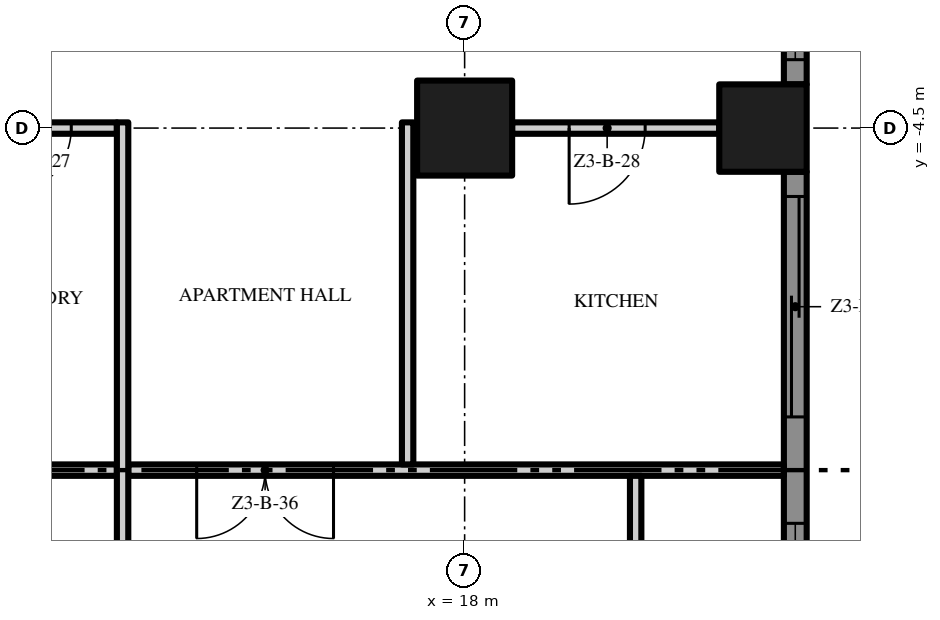
"""IFC4 building model, lengths in metres.
Left out: names, types, materials, properties, quantities, classifications, styles, units other than length and angle.
Written with IfcOpenShell. Run it as: python <this file> out.ifc"""

import sys

from ifc_helpers import new_model, si_unit, direction, frame, frame_2d, origin, origin_2d, place, context, subcontext, project, spatial, polyline, rectangle, outline, extrude, element, fill, save


model = new_model("IFC4")
c1 = context("Model", 3, precision=1e-05, world=origin(), true_north=direction((0.0, 1.0)))
c2 = subcontext(c1, "Body", "Model", "MODEL_VIEW")
j1 = project(units=[si_unit("LENGTHUNIT", "METRE"), si_unit("PLANEANGLEUNIT", "RADIAN")], contexts=[c1])
p1 = place(None, origin())
s1 = spatial("IfcSite", under=j1, at=p1, CompositionType="ELEMENT")
p2 = place(p1, origin())
s2 = spatial("IfcBuilding", under=s1, at=p2, CompositionType="ELEMENT")
p3 = place(p2, frame((0.0, 0.0, 140.2)))
s3 = spatial("IfcBuildingStorey", under=s2, at=p3, CompositionType="ELEMENT", Elevation=140.2)
p4 = place(p3, frame((18.0, -4.5, 0.0), z_axis=(0.0, 0.0, 1.0), x_axis=(1.0, 0.0, 0.0)))
e1 = element("IfcColumn", 1, at=p4, inside=s3, PredefinedType="COLUMN", context=c2, shape_type="SweptSolid", body=[
    extrude(rectangle(XDim=1.25, YDim=1.25, at=origin_2d()), origin(), (0.0, 0.0, 1.0), 3.5),
])
p5 = place(p3, frame((21.925, -4.5, 0.0), z_axis=(0.0, 0.0, 1.0), x_axis=(1.0, 0.0, 0.0)))
e2 = element("IfcColumn", 2, at=p5, inside=s3, PredefinedType="COLUMN", context=c2, shape_type="SweptSolid", body=[
    extrude(rectangle(XDim=1.15, YDim=1.15, at=origin_2d()), origin(), (0.0, 0.0, 1.0), 3.5),
])
p6 = place(p3, frame((22.35, -5.075, 0.0), z_axis=(0.0, 0.0, 1.0), x_axis=(0.0, -1.0, 0.0)))
e3 = element("IfcWall", 3, at=p6, inside=s3, PredefinedType="SOLIDWALL", context=c2, shape_type="SweptSolid", body=[
    extrude(rectangle(XDim=7.275, YDim=0.3, at=frame_2d((3.638, 0.0))), origin(), (0.0, 0.0, 1.0), 3.5),
])
p7 = place(p6, frame((4.625, 0.0, 0.45)))
e4 = element("IfcOpeningElement", 4, at=p7, cuts=e3, PredefinedType="OPENING", context=c2, shape_type="SweptSolid", body=[
    extrude(rectangle(XDim=2.35, YDim=2.65, at=frame_2d((1.175, 1.325))), frame((0.0, 0.16, 0.0), z_axis=(0.0, -1.0, 0.0), x_axis=(1.0, 0.0, 0.0)), (0.0, 0.0, 1.0), 0.32),
])
p8 = place(p6, frame((0.325, 0.0, 0.0)))
e5 = element("IfcOpeningElement", 5, at=p8, cuts=e3, PredefinedType="OPENING", context=c2, shape_type="SweptSolid", body=[
    extrude(rectangle(XDim=2.9, YDim=2.4, at=frame_2d((1.45, 1.2))), frame((0.0, 0.16, 0.0), z_axis=(0.0, -1.0, 0.0), x_axis=(1.0, 0.0, 0.0)), (0.0, 0.0, 1.0), 0.32),
])
p9 = place(p3, frame((22.35, 3.925, 0.0), z_axis=(0.0, 0.0, 1.0), x_axis=(0.0, -1.0, 0.0)))
e6 = element("IfcWall", 6, at=p9, inside=s3, PredefinedType="SOLIDWALL", context=c2, shape_type="SweptSolid", body=[
    extrude(rectangle(XDim=7.85, YDim=0.3, at=frame_2d((3.925, 0.0))), origin(), (0.0, 0.0, 1.0), 3.5),
])
p10 = place(p9, frame((4.625, 0.0, 0.45)))
e7 = element("IfcOpeningElement", 7, at=p10, cuts=e6, PredefinedType="OPENING", context=c2, shape_type="SweptSolid", body=[
    extrude(rectangle(XDim=2.9, YDim=2.65, at=frame_2d((1.45, 1.325))), frame((0.0, 0.16, 0.0), z_axis=(0.0, -1.0, 0.0), x_axis=(1.0, 0.0, 0.0)), (0.0, 0.0, 1.0), 0.32),
])
p11 = place(p9, frame((0.325, 0.0, 0.45)))
e8 = element("IfcOpeningElement", 8, at=p11, cuts=e6, PredefinedType="OPENING", context=c2, shape_type="SweptSolid", body=[
    extrude(rectangle(XDim=2.9, YDim=2.65, at=frame_2d((1.45, 1.325))), frame((0.0, 0.16, 0.0), z_axis=(0.0, -1.0, 0.0), x_axis=(1.0, 0.0, 0.0)), (0.0, 0.0, 1.0), 0.32),
])
p12 = place(p3, origin())
e9 = element("IfcWall", 9, at=p12, inside=s3, PredefinedType="USERDEFINED", context=c2, shape_type="SweptSolid", body=[
    extrude(outline(polyline([(23.451, -13.5), (24.112, -12.0), (24.845, -10.5), (25.369, -9.0), (25.5, -7.875), (25.485, -7.5), (25.149, -6.0), (24.488, -4.5), (23.755, -3.0), (23.231, -1.5), (23.1, -0.375), (23.115, 0.0), (23.451, 1.5), (24.112, 3.0), (24.845, 4.5), (25.369, 6.0), (25.5, 7.125), (25.485, 7.5), (25.149, 9.0), (24.488, 10.5), (23.755, 12.0), (23.231, 13.5), (23.1, 14.625), (23.115, 15.0), (23.451, 16.5), (24.112, 18.0), (23.883, 18.101), (23.213, 16.579), (22.866, 15.033), (22.849, 14.615), (22.986, 13.444), (23.524, 11.904), (24.261, 10.395), (24.91, 8.921), (25.236, 7.467), (25.249, 7.135), (25.124, 6.056), (24.614, 4.596), (23.885, 3.105), (23.213, 1.579), (22.866, 0.033), (22.849, -0.385), (22.986, -1.556), (23.524, -3.096), (24.261, -4.605), (24.91, -6.079), (25.236, -7.533), (25.249, -7.865), (25.124, -8.944), (24.614, -10.404), (23.885, -11.895), (23.223, -13.399), (23.451, -13.5)])), origin(), (0.0, 0.0, 1.0), 0.9),
])
p13 = place(p3, frame((13.425, -9.0, 0.0), z_axis=(0.0, 0.0, 1.0), x_axis=(-1.0, 0.0, 0.0)))
e10 = element("IfcWall", 10, at=p13, inside=s3, PredefinedType="PARTITIONING", context=c2, shape_type="SweptSolid", body=[
    extrude(rectangle(XDim=4.35, YDim=0.15, at=frame_2d((2.175, 0.0))), origin(), (0.0, 0.0, 1.0), 3.5),
])
p14 = place(p13, frame((2.8, 0.0, 0.0)))
e11 = element("IfcOpeningElement", 11, at=p14, cuts=e10, PredefinedType="OPENING", context=c2, shape_type="SweptSolid", body=[
    extrude(rectangle(XDim=1.0, YDim=2.4, at=frame_2d((0.5, 1.2))), frame((0.0, 0.085, 0.0), z_axis=(0.0, -1.0, 0.0), x_axis=(1.0, 0.0, 0.0)), (0.0, 0.0, 1.0), 0.17),
])
p15 = place(p3, frame((22.2, -9.0, 0.0), z_axis=(0.0, 0.0, 1.0), x_axis=(-1.0, 0.0, 0.0)))
e12 = element("IfcWall", 12, at=p15, inside=s3, PredefinedType="PARTITIONING", context=c2, shape_type="SweptSolid", body=[
    extrude(rectangle(XDim=8.625, YDim=0.15, at=frame_2d((4.312, 0.0))), origin(), (0.0, 0.0, 1.0), 3.5),
])
p16 = place(p15, frame((5.925, 0.0, 0.0)))
e13 = element("IfcOpeningElement", 13, at=p16, cuts=e12, PredefinedType="OPENING", context=c2, shape_type="SweptSolid", body=[
    extrude(rectangle(XDim=1.8, YDim=2.4, at=frame_2d((0.9, 1.2))), frame((0.0, 0.085, 0.0), z_axis=(0.0, -1.0, 0.0), x_axis=(1.0, 0.0, 0.0)), (0.0, 0.0, 1.0), 0.17),
])
p17 = place(p3, frame((13.425, -4.5, 0.0), z_axis=(0.0, 0.0, 1.0), x_axis=(-1.0, 0.0, 0.0)))
e14 = element("IfcWall", 14, at=p17, inside=s3, PredefinedType="PARTITIONING", context=c2, shape_type="SweptSolid", body=[
    extrude(rectangle(XDim=2.1, YDim=0.15, at=frame_2d((1.05, 0.0))), origin(), (0.0, 0.0, 1.0), 3.5),
])
p18 = place(p17, frame((0.6, 0.0, 0.0)))
e15 = element("IfcOpeningElement", 15, at=p18, cuts=e14, PredefinedType="OPENING", context=c2, shape_type="SweptSolid", body=[
    extrude(rectangle(XDim=0.9, YDim=2.1, at=frame_2d((0.45, 1.05))), frame((0.0, 0.085, 0.0), z_axis=(0.0, -1.0, 0.0), x_axis=(1.0, 0.0, 0.0)), (0.0, 0.0, 1.0), 0.17),
])
p19 = place(p3, frame((21.35, -4.5, 0.0), z_axis=(0.0, 0.0, 1.0), x_axis=(-1.0, 0.0, 0.0)))
e16 = element("IfcWall", 16, at=p19, inside=s3, PredefinedType="PARTITIONING", context=c2, shape_type="SweptSolid", body=[
    extrude(rectangle(XDim=2.725, YDim=0.15, at=frame_2d((1.363, 0.0))), origin(), (0.0, 0.0, 1.0), 3.5),
])
p20 = place(p19, frame((0.975, 0.0, 0.0)))
e17 = element("IfcOpeningElement", 17, at=p20, cuts=e16, PredefinedType="OPENING", context=c2, shape_type="SweptSolid", body=[
    extrude(rectangle(XDim=1.0, YDim=2.4, at=frame_2d((0.5, 1.2))), frame((0.0, 0.085, 0.0), z_axis=(0.0, -1.0, 0.0), x_axis=(1.0, 0.0, 0.0)), (0.0, 0.0, 1.0), 0.17),
])
p21 = place(p3, frame((13.5, -17.7, 0.0), z_axis=(0.0, 0.0, 1.0), x_axis=(0.0, 1.0, 0.0)))
e18 = element("IfcWall", 18, at=p21, inside=s3, PredefinedType="PARTITIONING", context=c2, shape_type="SweptSolid", body=[
    extrude(rectangle(XDim=13.275, YDim=0.15, at=frame_2d((6.638, 0.0))), origin(), (0.0, 0.0, 1.0), 3.5),
])
p22 = place(p3, frame((17.25, -8.925, 0.0), z_axis=(0.0, 0.0, 1.0), x_axis=(0.0, 1.0, 0.0)))
e19 = element("IfcWall", 19, at=p22, inside=s3, PredefinedType="PARTITIONING", context=c2, shape_type="SweptSolid", body=[
    extrude(rectangle(XDim=4.5, YDim=0.15, at=frame_2d((2.25, 0.0))), origin(), (0.0, 0.0, 1.0), 3.5),
])
p23 = place(p3, frame((20.25, -9.075, 0.0), z_axis=(0.0, 0.0, 1.0), x_axis=(0.0, -1.0, 0.0)))
e20 = element("IfcWall", 20, at=p23, inside=s3, PredefinedType="PARTITIONING", context=c2, shape_type="SweptSolid", body=[
    extrude(rectangle(XDim=3.0, YDim=0.15, at=frame_2d((1.5, 0.0))), origin(), (0.0, 0.0, 1.0), 3.5),
])
p24 = place(p23, frame((0.975, 0.0, 0.0)))
e21 = element("IfcOpeningElement", 21, at=p24, cuts=e20, PredefinedType="OPENING", context=c2, shape_type="SweptSolid", body=[
    extrude(rectangle(XDim=0.9, YDim=2.1, at=frame_2d((0.45, 1.05))), frame((0.0, 0.085, 0.0), z_axis=(0.0, -1.0, 0.0), x_axis=(1.0, 0.0, 0.0)), (0.0, 0.0, 1.0), 0.17),
])
p25 = place(p7, origin())
e22 = element("IfcWindow", 22, at=p25, inside=s3, PartitioningType="SINGLE_PANEL", PredefinedType="WINDOW", context=c2, shape_type="SweptSolid", body=[
    extrude(rectangle(XDim=2.35, YDim=2.65, at=frame_2d((1.175, 1.325))), frame((0.0, 0.03, 0.0), z_axis=(0.0, -1.0, 0.0), x_axis=(1.0, 0.0, 0.0)), (0.0, 0.0, 1.0), 0.06),
])
fill(e4, e22)
p26 = place(p8, origin())
e23 = element("IfcDoor", 23, at=p26, inside=s3, OperationType="SINGLE_SWING_LEFT", PredefinedType="DOOR", context=c2, shape_type="SweptSolid", body=[
    extrude(rectangle(XDim=2.9, YDim=2.4, at=frame_2d((1.45, 1.2))), frame((0.0, 0.025, 0.0), z_axis=(0.0, -1.0, 0.0), x_axis=(1.0, 0.0, 0.0)), (0.0, 0.0, 1.0), 0.05),
])
fill(e5, e23)
p27 = place(p10, origin())
e24 = element("IfcWindow", 24, at=p27, inside=s3, PartitioningType="SINGLE_PANEL", PredefinedType="WINDOW", context=c2, shape_type="SweptSolid", body=[
    extrude(rectangle(XDim=2.9, YDim=2.65, at=frame_2d((1.45, 1.325))), frame((0.0, 0.03, 0.0), z_axis=(0.0, -1.0, 0.0), x_axis=(1.0, 0.0, 0.0)), (0.0, 0.0, 1.0), 0.06),
])
fill(e7, e24)
p28 = place(p18, origin())
e25 = element("IfcDoor", 25, at=p28, inside=s3, OperationType="SINGLE_SWING_RIGHT", PredefinedType="DOOR", context=c2, shape_type="SweptSolid", body=[
    extrude(rectangle(XDim=0.9, YDim=2.1, at=frame_2d((0.45, 1.05))), frame((0.0, 0.025, 0.0), z_axis=(0.0, -1.0, 0.0), x_axis=(1.0, 0.0, 0.0)), (0.0, 0.0, 1.0), 0.05),
])
fill(e15, e25)
p29 = place(p20, origin())
e26 = element("IfcDoor", 26, at=p29, inside=s3, OperationType="SINGLE_SWING_RIGHT", PredefinedType="DOOR", context=c2, shape_type="SweptSolid", body=[
    extrude(rectangle(XDim=1.0, YDim=2.4, at=frame_2d((0.5, 1.2))), frame((0.0, 0.025, 0.0), z_axis=(0.0, -1.0, 0.0), x_axis=(1.0, 0.0, 0.0)), (0.0, 0.0, 1.0), 0.05),
])
fill(e17, e26)
p30 = place(p16, origin())
e27 = element("IfcDoor", 27, at=p30, inside=s3, OperationType="DOUBLE_DOOR_SINGLE_SWING", PredefinedType="DOOR", context=c2, shape_type="SweptSolid", body=[
    extrude(rectangle(XDim=1.8, YDim=2.4, at=frame_2d((0.9, 1.2))), frame((0.0, 0.025, 0.0), z_axis=(0.0, -1.0, 0.0), x_axis=(1.0, 0.0, 0.0)), (0.0, 0.0, 1.0), 0.05),
])
fill(e13, e27)
save(model, sys.argv[1])
